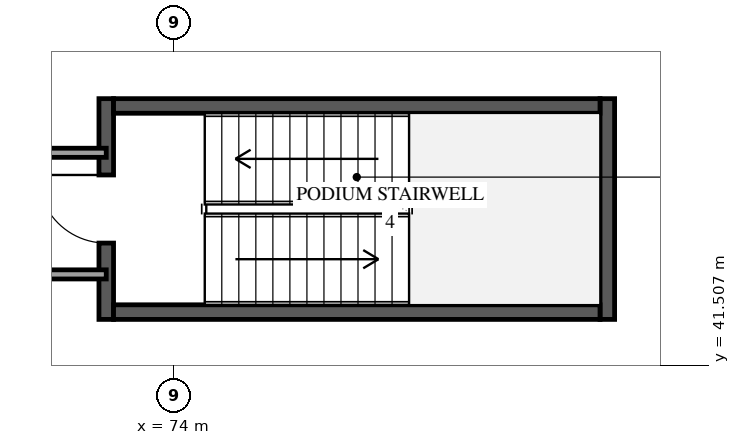
"""IFC4 building model, lengths in metres.
Left out: names, types, materials, properties, quantities, classifications, styles, units other than length and angle.
Written with IfcOpenShell. Run it as: python <this file> out.ifc"""

import sys

from ifc_helpers import new_model, si_unit, direction, frame, frame_2d, origin, place, context, subcontext, project, spatial, rectangle, extrude, element, fill, save


model = new_model("IFC4")
c1 = context("Model", 3, precision=1e-05, world=origin(), true_north=direction((0.0, 1.0)))
c2 = subcontext(c1, "Body", "Model", "MODEL_VIEW")
j1 = project(units=[si_unit("LENGTHUNIT", "METRE"), si_unit("PLANEANGLEUNIT", "RADIAN")], contexts=[c1])
p1 = place(None, origin())
s1 = spatial("IfcSite", under=j1, at=p1, CompositionType="ELEMENT")
p2 = place(p1, origin())
s2 = spatial("IfcBuilding", under=s1, at=p2, CompositionType="ELEMENT")
p3 = place(p2, frame((0.0, 0.0, 16.2)))
s3 = spatial("IfcBuildingStorey", under=s2, at=p3, CompositionType="ELEMENT", Elevation=16.2)
p4 = place(p3, frame((72.88, 42.26, 0.0), z_axis=(0.0, 0.0, 1.0), x_axis=(0.0, 1.0, 0.0)))
e1 = element("IfcWall", 1, at=p4, inside=s3, PredefinedType="SHEAR", context=c2, shape_type="SweptSolid", body=[
    extrude(rectangle(XDim=3.63, YDim=0.24, at=frame_2d((1.815, 0.0))), origin(), (0.0, 0.0, 1.0), 4.5),
])
p5 = place(p4, frame((1.255, 0.0, 0.0)))
e2 = element("IfcOpeningElement", 2, at=p5, cuts=e1, PredefinedType="OPENING", context=c2, shape_type="SweptSolid", body=[
    extrude(rectangle(XDim=1.12, YDim=2.15, at=frame_2d((0.56, 1.075))), frame((0.0, 0.13, 0.0), z_axis=(0.0, -1.0, 0.0), x_axis=(1.0, 0.0, 0.0)), (0.0, 0.0, 1.0), 0.26),
])
p6 = place(p3, frame((81.12, 42.26, 0.0), z_axis=(0.0, 0.0, 1.0), x_axis=(0.0, 1.0, 0.0)))
e3 = element("IfcWall", 3, at=p6, inside=s3, PredefinedType="SHEAR", context=c2, shape_type="SweptSolid", body=[
    extrude(rectangle(XDim=3.63, YDim=0.24, at=frame_2d((1.815, 0.0))), origin(), (0.0, 0.0, 1.0), 4.5),
])
for number, where, z_axis, x_axis in (
    (4, (73.0, 42.38, 0.0), (0.0, 0.0, 1.0), (1.0, 0.0, 0.0)),
    (5, (73.0, 45.77, 0.0), (0.0, 0.0, 1.0), (1.0, 0.0, 0.0)),
):
    element("IfcWall", number, at=place(p3, frame(where, z_axis=z_axis, x_axis=x_axis)), inside=s3, PredefinedType="SHEAR", context=c2, shape_type="SweptSolid", body=[
        extrude(rectangle(XDim=8.0, YDim=0.24, at=frame_2d((4.0, 0.0))), origin(), (0.0, 0.0, 1.0), 4.5),
    ])
p7 = place(p3, frame((44.87, 45.0, 0.0), z_axis=(0.0, 0.0, 1.0), x_axis=(1.0, 0.0, 0.0)))
e6 = element("IfcWall", 6, at=p7, inside=s3, PredefinedType="PARTITIONING", context=c2, shape_type="SweptSolid", body=[
    extrude(rectangle(XDim=28.01, YDim=0.15, at=frame_2d((14.005, 0.0))), origin(), (0.0, 0.0, 1.0), 4.18),
])
p8 = place(p7, frame((13.53, 0.0, 0.0)))
e7 = element("IfcOpeningElement", 7, at=p8, cuts=e6, PredefinedType="OPENING", context=c2, shape_type="SweptSolid", body=[
    extrude(rectangle(XDim=0.92, YDim=2.12, at=frame_2d((0.46, 1.06))), frame((0.0, 0.085, 0.0), z_axis=(0.0, -1.0, 0.0), x_axis=(1.0, 0.0, 0.0)), (0.0, 0.0, 1.0), 0.17),
])
p9 = place(p3, frame((72.88, 43.0, 0.0), z_axis=(0.0, 0.0, 1.0), x_axis=(-1.0, 0.0, 0.0)))
e8 = element("IfcWall", 8, at=p9, inside=s3, PredefinedType="PARTITIONING", context=c2, shape_type="SweptSolid", body=[
    extrude(rectangle(XDim=8.81, YDim=0.15, at=frame_2d((4.405, 0.0))), origin(), (0.0, 0.0, 1.0), 4.18),
])
p10 = place(p5, origin())
e9 = element("IfcDoor", 9, at=p10, inside=s3, OperationType="SINGLE_SWING_RIGHT", PredefinedType="DOOR", context=c2, shape_type="SweptSolid", body=[
    extrude(rectangle(XDim=1.12, YDim=2.15, at=frame_2d((0.56, 1.075))), frame((0.0, 0.025, 0.0), z_axis=(0.0, -1.0, 0.0), x_axis=(1.0, 0.0, 0.0)), (0.0, 0.0, 1.0), 0.05),
])
fill(e2, e9)
save(model, sys.argv[1])
